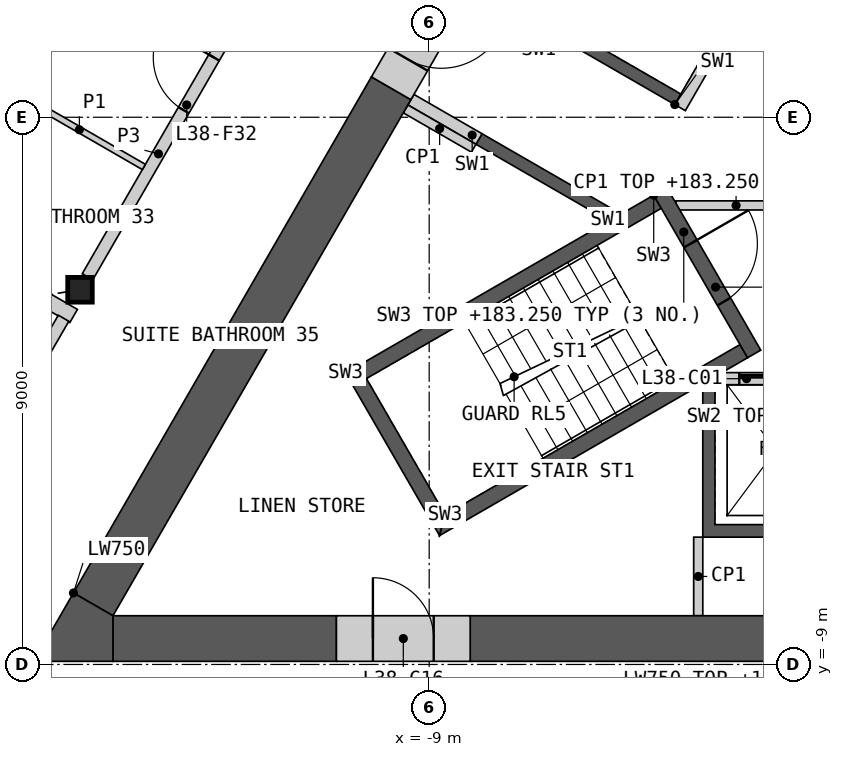
"""IFC4 building model, lengths in metres.
Left out: names, types, materials, properties, quantities, classifications, styles, units other than length and angle.
Written with IfcOpenShell. Run it as: python <this file> out.ifc"""

import sys

from ifc_helpers import new_model, si_unit, direction, frame, frame_2d, origin, origin_2d, place, context, subcontext, project, spatial, polyline, rectangle, i_section, outline, extrude, element, fill, save


model = new_model("IFC4")
c1 = context("Model", 3, precision=1e-05, world=origin(), true_north=direction((0.0, 1.0)))
c2 = subcontext(c1, "Body", "Model", "MODEL_VIEW")
j1 = project(units=[si_unit("LENGTHUNIT", "METRE"), si_unit("PLANEANGLEUNIT", "RADIAN")], contexts=[c1])
p1 = place(None, origin())
s1 = spatial("IfcSite", under=j1, at=p1, CompositionType="ELEMENT")
p2 = place(p1, origin())
s2 = spatial("IfcBuilding", under=s1, at=p2, CompositionType="ELEMENT")
p3 = place(p2, frame((0.0, 0.0, 180.0)))
s3 = spatial("IfcBuildingStorey", under=s2, at=p3, CompositionType="ELEMENT", Elevation=180.0)
p4 = place(p3, frame((-14.743, -2.837, 0.0), z_axis=(0.0, 0.0, 1.0), x_axis=(1.0, 0.0, 0.0)))
e1 = element("IfcColumn", 1, at=p4, inside=s3, PredefinedType="COLUMN", context=c2, shape_type="SweptSolid", body=[
    extrude(i_section(OverallWidth=0.404, OverallDepth=0.407, WebThickness=0.027, FlangeThickness=0.044, at=origin_2d()), origin(), (0.0, 0.0, 1.0), 3.6),
])
p5 = place(p3, origin())
e2 = element("IfcWall", 2, at=p5, inside=s3, PredefinedType="SHEAR", context=c2, shape_type="SweptSolid", body=[
    extrude(outline(polyline([(0.1, -4.4), (0.1, -6.906), (-4.5, -6.906), (-4.5, -4.4), (-4.3, -4.4), (-4.3, -6.7), (-2.3, -6.7), (-2.3, -4.4), (-2.1, -4.4), (-2.1, -6.7), (-0.1, -6.7), (-0.1, -4.4), (0.1, -4.4)])), origin(), (0.0, 0.0, 1.0), 3.25),
])
p6 = place(p3, frame((-4.187, -4.3, 0.0), z_axis=(0.0, 0.0, 1.0), x_axis=(1.0, 0.0, 0.0)))
e3 = element("IfcWall", 3, at=p6, inside=s3, PredefinedType="SOLIDWALL", context=c2, shape_type="SweptSolid", body=[
    extrude(rectangle(XDim=8.373, YDim=0.2, at=frame_2d((4.187, 0.0))), origin(), (0.0, 0.0, 1.0), 3.25),
])
p7 = place(p6, frame((0.287, 0.0, 0.0)))
e4 = element("IfcOpeningElement", 4, at=p7, cuts=e3, PredefinedType="OPENING", context=c2, shape_type="SweptSolid", body=[
    extrude(rectangle(XDim=1.2, YDim=2.1, at=frame_2d((0.6, 1.05))), frame((0.0, 0.11, 0.0), z_axis=(0.0, -1.0, 0.0), x_axis=(1.0, 0.0, 0.0)), (0.0, 0.0, 1.0), 0.22),
])
p8 = place(p6, frame((2.387, 0.0, 0.0)))
e5 = element("IfcOpeningElement", 5, at=p8, cuts=e3, PredefinedType="OPENING", context=c2, shape_type="SweptSolid", body=[
    extrude(rectangle(XDim=1.4, YDim=2.1, at=frame_2d((0.7, 1.05))), frame((0.0, 0.11, 0.0), z_axis=(0.0, -1.0, 0.0), x_axis=(1.0, 0.0, 0.0)), (0.0, 0.0, 1.0), 0.22),
])
p9 = place(p6, frame((4.837, 0.0, 0.0)))
e6 = element("IfcOpeningElement", 6, at=p9, cuts=e3, PredefinedType="OPENING", context=c2, shape_type="SweptSolid", body=[
    extrude(rectangle(XDim=0.9, YDim=2.1, at=frame_2d((0.45, 1.05))), frame((0.0, 0.11, 0.0), z_axis=(0.0, -1.0, 0.0), x_axis=(1.0, 0.0, 0.0)), (0.0, 0.0, 1.0), 0.22),
])
p10 = place(p6, frame((6.887, 0.0, 0.0)))
e7 = element("IfcOpeningElement", 7, at=p10, cuts=e3, PredefinedType="OPENING", context=c2, shape_type="SweptSolid", body=[
    extrude(rectangle(XDim=1.2, YDim=2.1, at=frame_2d((0.6, 1.05))), frame((0.0, 0.11, 0.0), z_axis=(0.0, -1.0, 0.0), x_axis=(1.0, 0.0, 0.0)), (0.0, 0.0, 1.0), 0.22),
])
p11 = place(p3, origin())
e8 = element("IfcWall", 8, at=p11, inside=s3, PredefinedType="SHEAR", context=c2, shape_type="SweptSolid", body=[
    extrude(outline(polyline([(-6.061, -1.697), (-8.231, -0.444), (-8.131, -0.271), (-5.96, -1.524), (-6.061, -1.697)])), origin(), (0.0, 0.0, 1.0), 3.25),
])
p12 = place(p3, origin())
e9 = element("IfcWall", 9, at=p12, inside=s3, PredefinedType="SHEAR", context=c2, shape_type="SweptSolid", body=[
    extrude(outline(polyline([(-4.96, 0.208), (-7.131, 1.461), (-3.731, 7.35), (-1.561, 6.097), (-1.66, 5.924), (-3.652, 7.074), (-4.652, 5.342), (-2.66, 4.192), (-2.76, 4.019), (-4.752, 5.169), (-5.752, 3.437), (-3.76, 2.287), (-3.861, 2.113), (-5.852, 3.263), (-6.852, 1.531), (-4.861, 0.381), (-4.96, 0.208)])), origin(), (0.0, 0.0, 1.0), 3.25),
])
p13 = place(p3, frame((-1.631, 5.776, 0.0), z_axis=(0.0, 0.0, 1.0), x_axis=(-0.499992876559, -0.866029516466, 0.0)))
e10 = element("IfcWall", 10, at=p13, inside=s3, PredefinedType="SOLIDWALL", context=c2, shape_type="SweptSolid", body=[
    extrude(rectangle(XDim=6.486, YDim=0.2, at=frame_2d((3.243, 0.0))), origin(), (0.0, 0.0, 1.0), 3.25),
])
p14 = place(p13, frame((0.337, 0.0, 0.0)))
e11 = element("IfcOpeningElement", 11, at=p14, cuts=e10, PredefinedType="OPENING", context=c2, shape_type="SweptSolid", body=[
    extrude(rectangle(XDim=1.1, YDim=2.1, at=frame_2d((0.55, 1.05))), frame((0.0, 0.11, 0.0), z_axis=(0.0, -1.0, 0.0), x_axis=(1.0, 0.0, 0.0)), (0.0, 0.0, 1.0), 0.22),
])
p15 = place(p13, frame((2.537, 0.0, 0.0)))
e12 = element("IfcOpeningElement", 12, at=p15, cuts=e10, PredefinedType="OPENING", context=c2, shape_type="SweptSolid", body=[
    extrude(rectangle(XDim=1.1, YDim=2.1, at=frame_2d((0.55, 1.05))), frame((0.0, 0.11, 0.0), z_axis=(0.0, -1.0, 0.0), x_axis=(1.0, 0.0, 0.0)), (0.0, 0.0, 1.0), 0.22),
])
p16 = place(p3, frame((-8.181, -0.357, 0.0), z_axis=(0.0, 0.0, 1.0), x_axis=(-0.866003189247, 0.500038474733, 0.0)))
e13 = element("IfcWall", 13, at=p16, inside=s3, PredefinedType="SHEAR", context=c2, shape_type="SweptSolid", body=[
    extrude(rectangle(XDim=1.293, YDim=0.2, at=frame_2d((0.646, 0.0))), origin(), (0.0, 0.0, 1.0), 3.25),
])
p17 = place(p3, frame((-4.941, -1.45, 0.0), z_axis=(0.0, 0.0, 1.0), x_axis=(1.0, 0.0, 0.0)))
e14 = element("IfcWall", 14, at=p17, inside=s3, PredefinedType="PARTITIONING", context=c2, shape_type="SweptSolid", body=[
    extrude(rectangle(XDim=9.882, YDim=0.15, at=frame_2d((4.941, 0.0))), origin(), (0.0, 0.0, 1.0), 3.25),
])
p18 = place(p17, frame((4.391, 0.0, 0.0)))
e15 = element("IfcOpeningElement", 15, at=p18, cuts=e14, PredefinedType="OPENING", context=c2, shape_type="SweptSolid", body=[
    extrude(rectangle(XDim=1.1, YDim=2.1, at=frame_2d((0.55, 1.05))), frame((0.0, 0.085, 0.0), z_axis=(0.0, -1.0, 0.0), x_axis=(1.0, 0.0, 0.0)), (0.0, 0.0, 1.0), 0.17),
])
p19 = place(p3, origin())
e16 = element("IfcWall", 16, at=p19, inside=s3, PredefinedType="SHEAR", context=c2, shape_type="SweptSolid", body=[
    extrude(outline(polyline([(-5.307, -1.281), (-10.374, -4.206), (-10.032, -4.298), (-5.182, -1.498), (-5.307, -1.281)])), origin(), (0.0, 0.0, 1.0), 3.25),
])
p20 = place(p3, origin())
e17 = element("IfcWall", 17, at=p20, inside=s3, PredefinedType="SHEAR", context=c2, shape_type="SweptSolid", body=[
    extrude(outline(polyline([(-10.374, -4.206), (-8.83, -6.881), (-8.738, -6.539), (-10.032, -4.298), (-10.374, -4.206)])), origin(), (0.0, 0.0, 1.0), 3.25),
])
p21 = place(p3, origin())
e18 = element("IfcWall", 18, at=p21, inside=s3, PredefinedType="SHEAR", context=c2, shape_type="SweptSolid", body=[
    extrude(outline(polyline([(-8.738, -6.539), (-8.83, -6.881), (-3.763, -3.956), (-3.888, -3.739), (-8.738, -6.539)])), origin(), (0.0, 0.0, 1.0), 3.25),
])
p22 = place(p3, frame((-5.199, -1.219, 0.0), z_axis=(0.0, 0.0, 1.0), x_axis=(0.499982516597, -0.866035497597, 0.0)))
e19 = element("IfcWall", 19, at=p22, inside=s3, PredefinedType="SHEAR", context=c2, shape_type="SweptSolid", body=[
    extrude(rectangle(XDim=3.088, YDim=0.25, at=frame_2d((1.544, 0.0))), origin(), (0.0, 0.0, 1.0), 3.25),
])
p23 = place(p22, frame((0.994, 0.0, 0.0)))
e20 = element("IfcOpeningElement", 20, at=p23, cuts=e19, PredefinedType="OPENING", context=c2, shape_type="SweptSolid", body=[
    extrude(rectangle(XDim=1.1, YDim=2.1, at=frame_2d((0.55, 1.05))), frame((0.0, 0.135, 0.0), z_axis=(0.0, -1.0, 0.0), x_axis=(1.0, 0.0, 0.0)), (0.0, 0.0, 1.0), 0.27),
])
for number, where, z_axis, x_axis in (
    (21, (-4.575, -6.906, 0.0), (0.0, 0.0, 1.0), (0.0, -1.0, 0.0)),
    (22, (-8.268, -0.509, 0.0), (0.0, 0.0, 1.0), (-0.866, 0.5, 0.0)),
):
    element("IfcWall", number, at=place(p3, frame(where, z_axis=z_axis, x_axis=x_axis)), inside=s3, PredefinedType="PARTITIONING", context=c2, shape_type="SweptSolid", body=[
        extrude(rectangle(XDim=1.293, YDim=0.15, at=frame_2d((0.646, 0.0))), origin(), (0.0, 0.0, 1.0), 3.25),
    ])
p24 = place(p3, frame((-8.325, -8.574, 0.0), z_axis=(0.0, 0.0, 1.0), x_axis=(1.0, 0.0, 0.0)))
e23 = element("IfcWall", 23, at=p24, inside=s3, PredefinedType="SHEAR", context=c2, shape_type="SweptSolid", body=[
    extrude(rectangle(XDim=4.926, YDim=0.75, at=frame_2d((2.463, 0.0))), origin(), (0.0, 0.0, 1.0), 3.25),
])
p25 = place(p3, frame((-14.201, -8.574, 0.0), z_axis=(0.0, 0.0, 1.0), x_axis=(1.0, 0.0, 0.0)))
e24 = element("IfcWall", 24, at=p25, inside=s3, PredefinedType="SHEAR", context=c2, shape_type="SweptSolid", body=[
    extrude(rectangle(XDim=3.676, YDim=0.75, at=frame_2d((1.838, 0.0))), origin(), (0.0, 0.0, 1.0), 3.25),
])
p26 = place(p3, frame((-9.625, 0.477, 0.0), z_axis=(0.0, 0.0, 1.0), x_axis=(-0.499986234705, -0.866033351035, 0.0)))
e25 = element("IfcWall", 25, at=p26, inside=s3, PredefinedType="SHEAR", context=c2, shape_type="SweptSolid", body=[
    extrude(rectangle(XDim=9.801, YDim=0.75, at=frame_2d((4.9, 0.0))), origin(), (0.0, 0.0, 1.0), 3.25),
])
p27 = place(p3, origin())
e26 = element("IfcWall", 26, at=p27, inside=s3, PredefinedType="SHEAR", context=c2, shape_type="SweptSolid", body=[
    extrude(outline(polyline([(-14.851, -7.824), (-14.201, -8.199), (-14.201, -8.949), (-15.5, -8.949), (-14.851, -7.824)])), origin(), (0.0, 0.0, 1.0), 3.25),
])
p28 = place(p3, frame((-10.525, -8.574, 0.0), z_axis=(0.0, 0.0, 1.0), x_axis=(1.0, 0.0, 0.0)))
e27 = element("IfcWall", 27, at=p28, inside=s3, PredefinedType="SHEAR", context=c2, shape_type="SweptSolid", body=[
    extrude(rectangle(XDim=2.2, YDim=0.75, at=frame_2d((1.1, 0.0))), origin(), (0.0, 0.0, 1.0), 3.25),
])
p29 = place(p28, frame((0.6, 0.0, 0.0)))
e28 = element("IfcOpeningElement", 28, at=p29, cuts=e27, PredefinedType="OPENING", context=c2, shape_type="SweptSolid", body=[
    extrude(rectangle(XDim=1.0, YDim=2.1, at=frame_2d((0.5, 1.05))), frame((0.0, 0.385, 0.0), z_axis=(0.0, -1.0, 0.0), x_axis=(1.0, 0.0, 0.0)), (0.0, 0.0, 1.0), 0.77),
])
p30 = place(p3, frame((-8.525, 2.382, 0.0), z_axis=(0.0, 0.0, 1.0), x_axis=(-0.500077893725, -0.86598042715, 0.0)))
e29 = element("IfcWall", 29, at=p30, inside=s3, PredefinedType="SHEAR", context=c2, shape_type="SweptSolid", body=[
    extrude(rectangle(XDim=2.2, YDim=0.75, at=frame_2d((1.1, 0.0))), origin(), (0.0, 0.0, 1.0), 3.25),
])
p31 = place(p30, frame((0.55, 0.0, 0.0)))
e30 = element("IfcOpeningElement", 30, at=p31, cuts=e29, PredefinedType="OPENING", context=c2, shape_type="SweptSolid", body=[
    extrude(rectangle(XDim=1.1, YDim=2.1, at=frame_2d((0.55, 1.05))), frame((0.0, 0.385, 0.0), z_axis=(0.0, -1.0, 0.0), x_axis=(1.0, 0.0, 0.0)), (0.0, 0.0, 1.0), 0.77),
])
p32 = place(p3, frame((-26.164, 3.265, 0.0), z_axis=(0.0, 0.0, 1.0), x_axis=(0.866021313335, -0.500007084799, 0.0)))
e31 = element("IfcWall", 31, at=p32, inside=s3, PredefinedType="PARTITIONING", context=c2, shape_type="SweptSolid", body=[
    extrude(rectangle(XDim=13.068, YDim=0.25, at=frame_2d((6.534, 0.0))), origin(), (0.0, 0.0, 1.0), 2.404),
])
p33 = place(p3, frame((-14.619, -2.624, 0.0), z_axis=(0.0, 0.0, 1.0), x_axis=(0.50000393355, 0.866023132736, 0.0)))
e32 = element("IfcWall", 32, at=p33, inside=s3, PredefinedType="PARTITIONING", context=c2, shape_type="SweptSolid", body=[
    extrude(rectangle(XDim=9.335, YDim=0.2, at=frame_2d((4.667, 0.0))), origin(), (0.0, 0.0, 1.0), 3.25),
])
p34 = place(p33, frame((4.77, 0.0, 0.0)))
e33 = element("IfcOpeningElement", 33, at=p34, cuts=e32, PredefinedType="OPENING", context=c2, shape_type="SweptSolid", body=[
    extrude(rectangle(XDim=1.0, YDim=2.1, at=frame_2d((0.5, 1.05))), frame((0.0, 0.11, 0.0), z_axis=(0.0, -1.0, 0.0), x_axis=(1.0, 0.0, 0.0)), (0.0, 0.0, 1.0), 0.22),
])
p35 = place(p33, frame((3.163, 0.0, 0.0)))
e34 = element("IfcOpeningElement", 34, at=p35, cuts=e32, PredefinedType="OPENING", context=c2, shape_type="SweptSolid", body=[
    extrude(rectangle(XDim=1.0, YDim=2.1, at=frame_2d((0.5, 1.05))), frame((0.0, 0.11, 0.0), z_axis=(0.0, -1.0, 0.0), x_axis=(1.0, 0.0, 0.0)), (0.0, 0.0, 1.0), 0.22),
])
p36 = place(p3, frame((-17.744, -8.035, 0.0), z_axis=(0.0, 0.0, 1.0), x_axis=(0.49998041698, 0.866036709751, 0.0)))
e35 = element("IfcWall", 35, at=p36, inside=s3, PredefinedType="PARTITIONING", context=c2, shape_type="SweptSolid", body=[
    extrude(rectangle(XDim=5.462, YDim=0.2, at=frame_2d((2.731, 0.0))), origin(), (0.0, 0.0, 1.0), 3.25),
])
p37 = place(p36, frame((0.352, 0.0, 0.0)))
e36 = element("IfcOpeningElement", 36, at=p37, cuts=e35, PredefinedType="OPENING", context=c2, shape_type="SweptSolid", body=[
    extrude(rectangle(XDim=1.1, YDim=2.1, at=frame_2d((0.55, 1.05))), frame((0.0, 0.11, 0.0), z_axis=(0.0, -1.0, 0.0), x_axis=(1.0, 0.0, 0.0)), (0.0, 0.0, 1.0), 0.22),
])
p38 = place(p3, frame((-15.814, 0.407, 0.0), z_axis=(0.0, 0.0, 1.0), x_axis=(0.866057815567, -0.499943856944, 0.0)))
e37 = element("IfcWall", 37, at=p38, inside=s3, PredefinedType="PARTITIONING", context=c2, shape_type="SweptSolid", body=[
    extrude(rectangle(XDim=2.45, YDim=0.1, at=frame_2d((1.225, 0.0))), origin(), (0.0, 0.0, 1.0), 2.404),
])
p39 = place(p7, origin())
e38 = element("IfcDoor", 38, at=p39, inside=s3, OperationType="SLIDING_TO_LEFT", PredefinedType="DOOR", context=c2, shape_type="SweptSolid", body=[
    extrude(rectangle(XDim=1.2, YDim=2.1, at=frame_2d((0.6, 1.05))), frame((0.0, 0.025, 0.0), z_axis=(0.0, -1.0, 0.0), x_axis=(1.0, 0.0, 0.0)), (0.0, 0.0, 1.0), 0.05),
])
fill(e4, e38)
p40 = place(p23, origin())
e39 = element("IfcDoor", 39, at=p40, inside=s3, OperationType="SINGLE_SWING_LEFT", PredefinedType="DOOR", context=c2, shape_type="SweptSolid", body=[
    extrude(rectangle(XDim=1.1, YDim=2.1, at=frame_2d((0.55, 1.05))), frame((0.0, 0.025, 0.0), z_axis=(0.0, -1.0, 0.0), x_axis=(1.0, 0.0, 0.0)), (0.0, 0.0, 1.0), 0.05),
])
fill(e20, e39)
p41 = place(p29, origin())
e40 = element("IfcDoor", 40, at=p41, inside=s3, OperationType="SINGLE_SWING_LEFT", PredefinedType="DOOR", context=c2, shape_type="SweptSolid", body=[
    extrude(rectangle(XDim=1.0, YDim=2.1, at=frame_2d((0.5, 1.05))), frame((0.0, 0.13, 0.0), z_axis=(0.0, -1.0, 0.0), x_axis=(1.0, 0.0, 0.0)), (0.0, 0.0, 1.0), 0.05),
])
fill(e28, e40)
p42 = place(p31, origin())
e41 = element("IfcDoor", 41, at=p42, inside=s3, OperationType="SINGLE_SWING_LEFT", PredefinedType="DOOR", context=c2, shape_type="SweptSolid", body=[
    extrude(rectangle(XDim=1.1, YDim=2.1, at=frame_2d((0.55, 1.05))), frame((0.0, 0.13, 0.0), z_axis=(0.0, -1.0, 0.0), x_axis=(1.0, 0.0, 0.0)), (0.0, 0.0, 1.0), 0.05),
])
fill(e30, e41)
p43 = place(p35, origin())
e42 = element("IfcDoor", 42, at=p43, inside=s3, OperationType="SINGLE_SWING_RIGHT", PredefinedType="DOOR", context=c2, shape_type="SweptSolid", body=[
    extrude(rectangle(XDim=1.0, YDim=2.1, at=frame_2d((0.5, 1.05))), frame((0.0, 0.025, 0.0), z_axis=(0.0, -1.0, 0.0), x_axis=(1.0, 0.0, 0.0)), (0.0, 0.0, 1.0), 0.05),
])
fill(e34, e42)
save(model, sys.argv[1])
